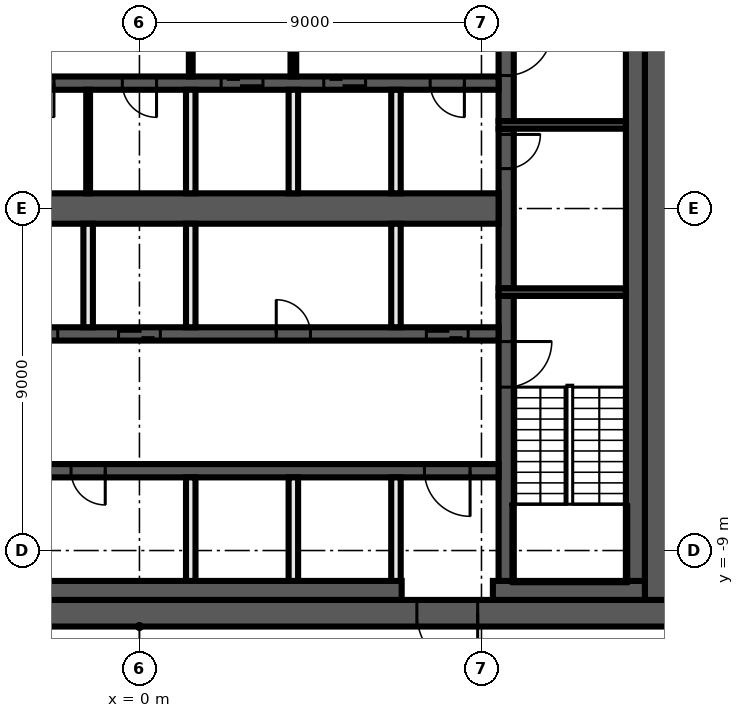
"""IFC4 building model, lengths in metres.
Left out: names, types, materials, properties, quantities, classifications, styles, units other than length and angle.
Written with IfcOpenShell. Run it as: python <this file> out.ifc"""

import sys

from ifc_helpers import new_model, si_unit, direction, frame, frame_2d, origin, place, context, subcontext, project, spatial, rectangle, extrude, element, fill, save


model = new_model("IFC4")
c1 = context("Model", 3, precision=1e-05, world=origin(), true_north=direction((0.0, 1.0)))
c2 = subcontext(c1, "Body", "Model", "MODEL_VIEW")
j1 = project(units=[si_unit("LENGTHUNIT", "METRE"), si_unit("PLANEANGLEUNIT", "RADIAN")], contexts=[c1])
p1 = place(None, origin())
s1 = spatial("IfcSite", under=j1, at=p1, CompositionType="ELEMENT")
p2 = place(p1, origin())
s2 = spatial("IfcBuilding", under=s1, at=p2, CompositionType="ELEMENT")
p3 = place(p2, frame((0.0, 0.0, 270.6)))
s3 = spatial("IfcBuildingStorey", under=s2, at=p3, CompositionType="ELEMENT", Elevation=270.6)
p4 = place(p3, frame((14.0, -10.65, 0.0), z_axis=(0.0, 0.0, 1.0), x_axis=(-1.0, 0.0, 0.0)))
e1 = element("IfcWall", 1, at=p4, inside=s3, PredefinedType="SHEAR", context=c2, shape_type="SweptSolid", body=[
    extrude(rectangle(XDim=28.0, YDim=0.7, at=frame_2d((14.0, 0.0))), origin(), (0.0, 0.0, 1.0), 3.82),
])
p5 = place(p4, frame((5.1, 0.0, 0.0)))
e2 = element("IfcOpeningElement", 2, at=p5, cuts=e1, PredefinedType="OPENING", context=c2, shape_type="SweptSolid", body=[
    extrude(rectangle(XDim=1.6, YDim=2.1, at=frame_2d((0.8, 1.05))), frame((0.0, 0.36, 0.0), z_axis=(0.0, -1.0, 0.0), x_axis=(1.0, 0.0, 0.0)), (0.0, 0.0, 1.0), 0.72),
])
p6 = place(p3, frame((13.65, 10.3, 0.0), z_axis=(0.0, 0.0, 1.0), x_axis=(0.0, -1.0, 0.0)))
e3 = element("IfcWall", 3, at=p6, inside=s3, PredefinedType="SHEAR", context=c2, shape_type="SweptSolid", body=[
    extrude(rectangle(XDim=20.6, YDim=0.7, at=frame_2d((10.3, 0.0))), origin(), (0.0, 0.0, 1.0), 3.82),
])
p7 = place(p3, frame((13.3, -10.05, 0.0), z_axis=(0.0, 0.0, 1.0), x_axis=(-1.0, 0.0, 0.0)))
e4 = element("IfcWall", 4, at=p7, inside=s3, PredefinedType="SHEAR", context=c2, shape_type="SweptSolid", body=[
    extrude(rectangle(XDim=4.0, YDim=0.5, at=frame_2d((2.0, 0.0))), origin(), (0.0, 0.0, 1.0), 3.82),
])
p8 = place(p3, frame((6.9, -10.05, 0.0), z_axis=(0.0, 0.0, 1.0), x_axis=(-1.0, 0.0, 0.0)))
e5 = element("IfcWall", 5, at=p8, inside=s3, PredefinedType="SHEAR", context=c2, shape_type="SweptSolid", body=[
    extrude(rectangle(XDim=20.2, YDim=0.5, at=frame_2d((10.1, 0.0))), origin(), (0.0, 0.0, 1.0), 3.82),
])
p9 = place(p3, frame((13.05, 9.8, 0.0), z_axis=(0.0, 0.0, 1.0), x_axis=(0.0, -1.0, 0.0)))
e6 = element("IfcWall", 6, at=p9, inside=s3, PredefinedType="SHEAR", context=c2, shape_type="SweptSolid", body=[
    extrude(rectangle(XDim=19.6, YDim=0.5, at=frame_2d((9.8, 0.0))), origin(), (0.0, 0.0, 1.0), 3.82),
])
p10 = place(p3, frame((9.65, -2.3, 0.0), z_axis=(0.0, 0.0, 1.0), x_axis=(0.0, -1.0, 0.0)))
e7 = element("IfcWall", 7, at=p10, inside=s3, PredefinedType="SHEAR", context=c2, shape_type="SweptSolid", body=[
    extrude(rectangle(XDim=7.5, YDim=0.4, at=frame_2d((3.75, 0.0))), origin(), (0.0, 0.0, 1.0), 3.82),
])
p11 = place(p10, frame((1.2, 0.0, 0.0)))
e8 = element("IfcOpeningElement", 8, at=p11, cuts=e7, PredefinedType="OPENING", context=c2, shape_type="SweptSolid", body=[
    extrude(rectangle(XDim=1.2, YDim=2.1, at=frame_2d((0.6, 1.05))), frame((0.0, 0.21, 0.0), z_axis=(0.0, -1.0, 0.0), x_axis=(1.0, 0.0, 0.0)), (0.0, 0.0, 1.0), 0.42),
])
p12 = place(p3, frame((9.65, 2.1, 0.0), z_axis=(0.0, 0.0, 1.0), x_axis=(0.0, -1.0, 0.0)))
e9 = element("IfcWall", 9, at=p12, inside=s3, PredefinedType="SHEAR", context=c2, shape_type="SweptSolid", body=[
    extrude(rectangle(XDim=4.2, YDim=0.4, at=frame_2d((2.1, 0.0))), origin(), (0.0, 0.0, 1.0), 3.82),
])
p13 = place(p12, frame((0.15, 0.0, 0.0)))
e10 = element("IfcOpeningElement", 10, at=p13, cuts=e9, PredefinedType="OPENING", context=c2, shape_type="SweptSolid", body=[
    extrude(rectangle(XDim=0.9, YDim=2.1, at=frame_2d((0.45, 1.05))), frame((0.0, 0.21, 0.0), z_axis=(0.0, -1.0, 0.0), x_axis=(1.0, 0.0, 0.0)), (0.0, 0.0, 1.0), 0.42),
])
p14 = place(p3, frame((9.65, 9.8, 0.0), z_axis=(0.0, 0.0, 1.0), x_axis=(0.0, -1.0, 0.0)))
e11 = element("IfcWall", 11, at=p14, inside=s3, PredefinedType="SHEAR", context=c2, shape_type="SweptSolid", body=[
    extrude(rectangle(XDim=7.5, YDim=0.4, at=frame_2d((3.75, 0.0))), origin(), (0.0, 0.0, 1.0), 3.82),
])
p15 = place(p14, frame((5.1, 0.0, 0.0)))
e12 = element("IfcOpeningElement", 12, at=p15, cuts=e11, PredefinedType="OPENING", context=c2, shape_type="SweptSolid", body=[
    extrude(rectangle(XDim=1.2, YDim=2.1, at=frame_2d((0.6, 1.05))), frame((0.0, 0.21, 0.0), z_axis=(0.0, -1.0, 0.0), x_axis=(1.0, 0.0, 0.0)), (0.0, 0.0, 1.0), 0.42),
])
for number, where, z_axis, x_axis in (
    (13, (9.45, 2.2, 0.0), (0.0, 0.0, 1.0), (1.0, 0.0, 0.0)),
    (14, (9.45, -2.2, 0.0), (0.0, 0.0, 1.0), (1.0, 0.0, 0.0)),
):
    element("IfcWall", number, at=place(p3, frame(where, z_axis=z_axis, x_axis=x_axis)), inside=s3, PredefinedType="SHEAR", context=c2, shape_type="SweptSolid", body=[
        extrude(rectangle(XDim=3.35, YDim=0.2, at=frame_2d((1.675, 0.0))), origin(), (0.0, 0.0, 1.0), 3.82),
    ])
p16 = place(p3, frame((9.45, 3.3, 0.0), z_axis=(0.0, 0.0, 1.0), x_axis=(-1.0, 0.0, 0.0)))
e15 = element("IfcWall", 15, at=p16, inside=s3, PredefinedType="SHEAR", context=c2, shape_type="SweptSolid", body=[
    extrude(rectangle(XDim=18.9, YDim=0.35, at=frame_2d((9.45, 0.0))), origin(), (0.0, 0.0, 1.0), 3.82),
])
p17 = place(p16, frame((6.2, 0.0, 0.0)))
e16 = element("IfcOpeningElement", 16, at=p17, cuts=e15, PredefinedType="OPENING", context=c2, shape_type="SweptSolid", body=[
    extrude(rectangle(XDim=1.1, YDim=2.1, at=frame_2d((0.55, 1.05))), frame((0.0, 0.185, 0.0), z_axis=(0.0, -1.0, 0.0), x_axis=(1.0, 0.0, 0.0)), (0.0, 0.0, 1.0), 0.37),
])
p18 = place(p16, frame((3.5, 0.0, 0.0)))
e17 = element("IfcOpeningElement", 17, at=p18, cuts=e15, PredefinedType="OPENING", context=c2, shape_type="SweptSolid", body=[
    extrude(rectangle(XDim=1.1, YDim=2.1, at=frame_2d((0.55, 1.05))), frame((0.0, 0.185, 0.0), z_axis=(0.0, -1.0, 0.0), x_axis=(1.0, 0.0, 0.0)), (0.0, 0.0, 1.0), 0.37),
])
p19 = place(p16, frame((0.9, 0.0, 0.0)))
e18 = element("IfcOpeningElement", 18, at=p19, cuts=e15, PredefinedType="OPENING", context=c2, shape_type="SweptSolid", body=[
    extrude(rectangle(XDim=0.9, YDim=2.1, at=frame_2d((0.45, 1.05))), frame((0.0, 0.185, 0.0), z_axis=(0.0, -1.0, 0.0), x_axis=(1.0, 0.0, 0.0)), (0.0, 0.0, 1.0), 0.37),
])
p20 = place(p16, frame((17.1, 0.0, 0.0)))
e19 = element("IfcOpeningElement", 19, at=p20, cuts=e15, PredefinedType="OPENING", context=c2, shape_type="SweptSolid", body=[
    extrude(rectangle(XDim=0.9, YDim=2.1, at=frame_2d((0.45, 1.05))), frame((0.0, 0.185, 0.0), z_axis=(0.0, -1.0, 0.0), x_axis=(1.0, 0.0, 0.0)), (0.0, 0.0, 1.0), 0.37),
])
p21 = place(p16, frame((14.4, 0.0, 0.0)))
e20 = element("IfcOpeningElement", 20, at=p21, cuts=e15, PredefinedType="OPENING", context=c2, shape_type="SweptSolid", body=[
    extrude(rectangle(XDim=0.9, YDim=2.1, at=frame_2d((0.45, 1.05))), frame((0.0, 0.185, 0.0), z_axis=(0.0, -1.0, 0.0), x_axis=(1.0, 0.0, 0.0)), (0.0, 0.0, 1.0), 0.37),
])
p22 = place(p16, frame((11.7, 0.0, 0.0)))
e21 = element("IfcOpeningElement", 21, at=p22, cuts=e15, PredefinedType="OPENING", context=c2, shape_type="SweptSolid", body=[
    extrude(rectangle(XDim=0.9, YDim=2.1, at=frame_2d((0.45, 1.05))), frame((0.0, 0.185, 0.0), z_axis=(0.0, -1.0, 0.0), x_axis=(1.0, 0.0, 0.0)), (0.0, 0.0, 1.0), 0.37),
])
p23 = place(p16, frame((9.0, 0.0, 0.0)))
e22 = element("IfcOpeningElement", 22, at=p23, cuts=e15, PredefinedType="OPENING", context=c2, shape_type="SweptSolid", body=[
    extrude(rectangle(XDim=0.9, YDim=2.1, at=frame_2d((0.45, 1.05))), frame((0.0, 0.185, 0.0), z_axis=(0.0, -1.0, 0.0), x_axis=(1.0, 0.0, 0.0)), (0.0, 0.0, 1.0), 0.37),
])
p24 = place(p3, frame((-9.45, -3.3, 0.0), z_axis=(0.0, 0.0, 1.0), x_axis=(1.0, 0.0, 0.0)))
e23 = element("IfcWall", 23, at=p24, inside=s3, PredefinedType="SHEAR", context=c2, shape_type="SweptSolid", body=[
    extrude(rectangle(XDim=18.9, YDim=0.35, at=frame_2d((9.45, 0.0))), origin(), (0.0, 0.0, 1.0), 3.82),
])
p25 = place(p24, frame((0.8, 0.0, 0.0)))
e24 = element("IfcOpeningElement", 24, at=p25, cuts=e23, PredefinedType="OPENING", context=c2, shape_type="SweptSolid", body=[
    extrude(rectangle(XDim=1.1, YDim=2.1, at=frame_2d((0.55, 1.05))), frame((0.0, 0.185, 0.0), z_axis=(0.0, -1.0, 0.0), x_axis=(1.0, 0.0, 0.0)), (0.0, 0.0, 1.0), 0.37),
])
p26 = place(p24, frame((3.5, 0.0, 0.0)))
e25 = element("IfcOpeningElement", 25, at=p26, cuts=e23, PredefinedType="OPENING", context=c2, shape_type="SweptSolid", body=[
    extrude(rectangle(XDim=1.1, YDim=2.1, at=frame_2d((0.55, 1.05))), frame((0.0, 0.185, 0.0), z_axis=(0.0, -1.0, 0.0), x_axis=(1.0, 0.0, 0.0)), (0.0, 0.0, 1.0), 0.37),
])
p27 = place(p24, frame((6.2, 0.0, 0.0)))
e26 = element("IfcOpeningElement", 26, at=p27, cuts=e23, PredefinedType="OPENING", context=c2, shape_type="SweptSolid", body=[
    extrude(rectangle(XDim=1.1, YDim=2.1, at=frame_2d((0.55, 1.05))), frame((0.0, 0.185, 0.0), z_axis=(0.0, -1.0, 0.0), x_axis=(1.0, 0.0, 0.0)), (0.0, 0.0, 1.0), 0.37),
])
p28 = place(p24, frame((8.9, 0.0, 0.0)))
e27 = element("IfcOpeningElement", 27, at=p28, cuts=e23, PredefinedType="OPENING", context=c2, shape_type="SweptSolid", body=[
    extrude(rectangle(XDim=1.1, YDim=2.1, at=frame_2d((0.55, 1.05))), frame((0.0, 0.185, 0.0), z_axis=(0.0, -1.0, 0.0), x_axis=(1.0, 0.0, 0.0)), (0.0, 0.0, 1.0), 0.37),
])
p29 = place(p24, frame((17.0, 0.0, 0.0)))
e28 = element("IfcOpeningElement", 28, at=p29, cuts=e23, PredefinedType="OPENING", context=c2, shape_type="SweptSolid", body=[
    extrude(rectangle(XDim=1.1, YDim=2.1, at=frame_2d((0.55, 1.05))), frame((0.0, 0.185, 0.0), z_axis=(0.0, -1.0, 0.0), x_axis=(1.0, 0.0, 0.0)), (0.0, 0.0, 1.0), 0.37),
])
p30 = place(p24, frame((13.05, 0.0, 0.0)))
e29 = element("IfcOpeningElement", 29, at=p30, cuts=e23, PredefinedType="OPENING", context=c2, shape_type="SweptSolid", body=[
    extrude(rectangle(XDim=0.9, YDim=2.1, at=frame_2d((0.45, 1.05))), frame((0.0, 0.185, 0.0), z_axis=(0.0, -1.0, 0.0), x_axis=(1.0, 0.0, 0.0)), (0.0, 0.0, 1.0), 0.37),
])
p31 = place(p3, frame((9.45, -6.9, 0.0), z_axis=(0.0, 0.0, 1.0), x_axis=(-1.0, 0.0, 0.0)))
e30 = element("IfcWall", 30, at=p31, inside=s3, PredefinedType="SHEAR", context=c2, shape_type="SweptSolid", body=[
    extrude(rectangle(XDim=18.9, YDim=0.35, at=frame_2d((9.45, 0.0))), origin(), (0.0, 0.0, 1.0), 3.82),
])
p32 = place(p31, frame((0.75, 0.0, 0.0)))
e31 = element("IfcOpeningElement", 31, at=p32, cuts=e30, PredefinedType="OPENING", context=c2, shape_type="SweptSolid", body=[
    extrude(rectangle(XDim=1.2, YDim=2.1, at=frame_2d((0.6, 1.05))), frame((0.0, 0.185, 0.0), z_axis=(0.0, -1.0, 0.0), x_axis=(1.0, 0.0, 0.0)), (0.0, 0.0, 1.0), 0.37),
])
p33 = place(p31, frame((15.75, 0.0, 0.0)))
e32 = element("IfcOpeningElement", 32, at=p33, cuts=e30, PredefinedType="OPENING", context=c2, shape_type="SweptSolid", body=[
    extrude(rectangle(XDim=0.9, YDim=2.1, at=frame_2d((0.45, 1.05))), frame((0.0, 0.185, 0.0), z_axis=(0.0, -1.0, 0.0), x_axis=(1.0, 0.0, 0.0)), (0.0, 0.0, 1.0), 0.37),
])
p34 = place(p31, frame((10.35, 0.0, 0.0)))
e33 = element("IfcOpeningElement", 33, at=p34, cuts=e30, PredefinedType="OPENING", context=c2, shape_type="SweptSolid", body=[
    extrude(rectangle(XDim=0.9, YDim=2.1, at=frame_2d((0.45, 1.05))), frame((0.0, 0.185, 0.0), z_axis=(0.0, -1.0, 0.0), x_axis=(1.0, 0.0, 0.0)), (0.0, 0.0, 1.0), 0.37),
])
p35 = place(p3, frame((-9.45, 0.0, 0.0), z_axis=(0.0, 0.0, 1.0), x_axis=(1.0, 0.0, 0.0)))
e34 = element("IfcWall", 34, at=p35, inside=s3, PredefinedType="SHEAR", context=c2, shape_type="SweptSolid", body=[
    extrude(rectangle(XDim=18.9, YDim=0.8, at=frame_2d((9.45, 0.0))), origin(), (0.0, 0.0, 1.0), 3.82),
])
for number, where, z_axis, x_axis in (
    (35, (6.75, -9.8, 0.0), (0.0, 0.0, 1.0), (0.0, 1.0, 0.0)),
    (36, (6.75, -3.125, 0.0), (0.0, 0.0, 1.0), (0.0, 1.0, 0.0)),
    (37, (6.75, 0.4, 0.0), (0.0, 0.0, 1.0), (0.0, 1.0, 0.0)),
):
    element("IfcWall", number, at=place(p3, frame(where, z_axis=z_axis, x_axis=x_axis)), inside=s3, PredefinedType="SOLIDWALL", context=c2, shape_type="SweptSolid", body=[
        extrude(rectangle(XDim=2.725, YDim=0.25, at=frame_2d((1.363, 0.0))), origin(), (0.0, 0.0, 1.0), 3.82),
    ])
p36 = place(p3, frame((4.05, 6.725, 0.0), z_axis=(0.0, 0.0, 1.0), x_axis=(0.0, -1.0, 0.0)))
e38 = element("IfcWall", 38, at=p36, inside=s3, PredefinedType="PARTITIONING", context=c2, shape_type="SweptSolid", body=[
    extrude(rectangle(XDim=3.25, YDim=0.15, at=frame_2d((1.625, 0.0))), origin(), (0.0, 0.0, 1.0), 3.82),
])
p37 = place(p36, frame((1.025, 0.0, 0.0)))
e39 = element("IfcOpeningElement", 39, at=p37, cuts=e38, PredefinedType="OPENING", context=c2, shape_type="SweptSolid", body=[
    extrude(rectangle(XDim=1.2, YDim=2.1, at=frame_2d((0.6, 1.05))), frame((0.0, 0.085, 0.0), z_axis=(0.0, -1.0, 0.0), x_axis=(1.0, 0.0, 0.0)), (0.0, 0.0, 1.0), 0.17),
])
for number, where, z_axis, x_axis in (
    (40, (4.05, -9.8, 0.0), (0.0, 0.0, 1.0), (0.0, 1.0, 0.0)),
    (41, (4.05, 0.4, 0.0), (0.0, 0.0, 1.0), (0.0, 1.0, 0.0)),
):
    element("IfcWall", number, at=place(p3, frame(where, z_axis=z_axis, x_axis=x_axis)), inside=s3, PredefinedType="SOLIDWALL", context=c2, shape_type="SweptSolid", body=[
        extrude(rectangle(XDim=2.725, YDim=0.25, at=frame_2d((1.363, 0.0))), origin(), (0.0, 0.0, 1.0), 3.82),
    ])
p38 = place(p3, frame((1.35, 6.725, 0.0), z_axis=(0.0, 0.0, 1.0), x_axis=(0.0, -1.0, 0.0)))
e42 = element("IfcWall", 42, at=p38, inside=s3, PredefinedType="PARTITIONING", context=c2, shape_type="SweptSolid", body=[
    extrude(rectangle(XDim=3.25, YDim=0.1, at=frame_2d((1.625, 0.0))), origin(), (0.0, 0.0, 1.0), 3.82),
])
p39 = place(p38, frame((1.025, 0.0, 0.0)))
e43 = element("IfcOpeningElement", 43, at=p39, cuts=e42, PredefinedType="OPENING", context=c2, shape_type="SweptSolid", body=[
    extrude(rectangle(XDim=1.2, YDim=2.1, at=frame_2d((0.6, 1.05))), frame((0.0, 0.06, 0.0), z_axis=(0.0, -1.0, 0.0), x_axis=(1.0, 0.0, 0.0)), (0.0, 0.0, 1.0), 0.12),
])
for number, where, z_axis, x_axis in (
    (44, (1.35, -9.8, 0.0), (0.0, 0.0, 1.0), (0.0, 1.0, 0.0)),
    (45, (1.35, -3.125, 0.0), (0.0, 0.0, 1.0), (0.0, 1.0, 0.0)),
    (46, (1.35, 0.4, 0.0), (0.0, 0.0, 1.0), (0.0, 1.0, 0.0)),
):
    element("IfcWall", number, at=place(p3, frame(where, z_axis=z_axis, x_axis=x_axis)), inside=s3, PredefinedType="SOLIDWALL", context=c2, shape_type="SweptSolid", body=[
        extrude(rectangle(XDim=2.725, YDim=0.25, at=frame_2d((1.363, 0.0))), origin(), (0.0, 0.0, 1.0), 3.82),
    ])
p40 = place(p3, frame((-1.35, 0.4, 0.0), z_axis=(0.0, 0.0, 1.0), x_axis=(0.0, 1.0, 0.0)))
e47 = element("IfcWall", 47, at=p40, inside=s3, PredefinedType="PARTITIONING", context=c2, shape_type="SweptSolid", body=[
    extrude(rectangle(XDim=2.725, YDim=0.1, at=frame_2d((1.363, 0.0))), origin(), (0.0, 0.0, 1.0), 3.82),
])
p41 = place(p3, frame((-1.35, -3.125, 0.0), z_axis=(0.0, 0.0, 1.0), x_axis=(0.0, 1.0, 0.0)))
e48 = element("IfcWall", 48, at=p41, inside=s3, PredefinedType="SOLIDWALL", context=c2, shape_type="SweptSolid", body=[
    extrude(rectangle(XDim=2.725, YDim=0.25, at=frame_2d((1.363, 0.0))), origin(), (0.0, 0.0, 1.0), 3.82),
])
p42 = place(p13, origin())
e49 = element("IfcDoor", 49, at=p42, inside=s3, OperationType="SINGLE_SWING_RIGHT", PredefinedType="DOOR", context=c2, shape_type="SweptSolid", body=[
    extrude(rectangle(XDim=0.9, YDim=2.1, at=frame_2d((0.45, 1.05))), frame((0.0, 0.025, 0.0), z_axis=(0.0, -1.0, 0.0), x_axis=(1.0, 0.0, 0.0)), (0.0, 0.0, 1.0), 0.05),
])
fill(e10, e49)
p43 = place(p17, origin())
e50 = element("IfcDoor", 50, at=p43, inside=s3, OperationType="DOUBLE_DOOR_SLIDING", PredefinedType="DOOR", context=c2, shape_type="SweptSolid", body=[
    extrude(rectangle(XDim=1.1, YDim=2.1, at=frame_2d((0.55, 1.05))), frame((0.0, 0.025, 0.0), z_axis=(0.0, -1.0, 0.0), x_axis=(1.0, 0.0, 0.0)), (0.0, 0.0, 1.0), 0.05),
])
fill(e16, e50)
p44 = place(p18, origin())
e51 = element("IfcDoor", 51, at=p44, inside=s3, OperationType="DOUBLE_DOOR_SLIDING", PredefinedType="DOOR", context=c2, shape_type="SweptSolid", body=[
    extrude(rectangle(XDim=1.1, YDim=2.1, at=frame_2d((0.55, 1.05))), frame((0.0, 0.025, 0.0), z_axis=(0.0, -1.0, 0.0), x_axis=(1.0, 0.0, 0.0)), (0.0, 0.0, 1.0), 0.05),
])
fill(e17, e51)
p45 = place(p19, origin())
e52 = element("IfcDoor", 52, at=p45, inside=s3, OperationType="SINGLE_SWING_LEFT", PredefinedType="DOOR", context=c2, shape_type="SweptSolid", body=[
    extrude(rectangle(XDim=0.9, YDim=2.1, at=frame_2d((0.45, 1.05))), frame((0.0, 0.025, 0.0), z_axis=(0.0, -1.0, 0.0), x_axis=(1.0, 0.0, 0.0)), (0.0, 0.0, 1.0), 0.05),
])
fill(e18, e52)
p46 = place(p27, origin())
e53 = element("IfcDoor", 53, at=p46, inside=s3, OperationType="DOUBLE_DOOR_SLIDING", PredefinedType="DOOR", context=c2, shape_type="SweptSolid", body=[
    extrude(rectangle(XDim=1.1, YDim=2.1, at=frame_2d((0.55, 1.05))), frame((0.0, 0.025, 0.0), z_axis=(0.0, -1.0, 0.0), x_axis=(1.0, 0.0, 0.0)), (0.0, 0.0, 1.0), 0.05),
])
fill(e26, e53)
p47 = place(p28, origin())
e54 = element("IfcDoor", 54, at=p47, inside=s3, OperationType="DOUBLE_DOOR_SLIDING", PredefinedType="DOOR", context=c2, shape_type="SweptSolid", body=[
    extrude(rectangle(XDim=1.1, YDim=2.1, at=frame_2d((0.55, 1.05))), frame((0.0, 0.025, 0.0), z_axis=(0.0, -1.0, 0.0), x_axis=(1.0, 0.0, 0.0)), (0.0, 0.0, 1.0), 0.05),
])
fill(e27, e54)
p48 = place(p29, origin())
e55 = element("IfcDoor", 55, at=p48, inside=s3, OperationType="DOUBLE_DOOR_SLIDING", PredefinedType="DOOR", context=c2, shape_type="SweptSolid", body=[
    extrude(rectangle(XDim=1.1, YDim=2.1, at=frame_2d((0.55, 1.05))), frame((0.0, 0.025, 0.0), z_axis=(0.0, -1.0, 0.0), x_axis=(1.0, 0.0, 0.0)), (0.0, 0.0, 1.0), 0.05),
])
fill(e28, e55)
p49 = place(p5, origin())
e56 = element("IfcDoor", 56, at=p49, inside=s3, OperationType="DOUBLE_DOOR_SINGLE_SWING", PredefinedType="DOOR", context=c2, shape_type="SweptSolid", body=[
    extrude(rectangle(XDim=1.6, YDim=2.1, at=frame_2d((0.8, 1.05))), frame((0.0, 0.025, 0.0), z_axis=(0.0, -1.0, 0.0), x_axis=(1.0, 0.0, 0.0)), (0.0, 0.0, 1.0), 0.05),
])
fill(e2, e56)
p50 = place(p32, origin())
e57 = element("IfcDoor", 57, at=p50, inside=s3, OperationType="SINGLE_SWING_LEFT", PredefinedType="DOOR", context=c2, shape_type="SweptSolid", body=[
    extrude(rectangle(XDim=1.2, YDim=2.1, at=frame_2d((0.6, 1.05))), frame((0.0, 0.025, 0.0), z_axis=(0.0, -1.0, 0.0), x_axis=(1.0, 0.0, 0.0)), (0.0, 0.0, 1.0), 0.05),
])
fill(e31, e57)
p51 = place(p22, origin())
e58 = element("IfcDoor", 58, at=p51, inside=s3, OperationType="SINGLE_SWING_RIGHT", PredefinedType="DOOR", context=c2, shape_type="SweptSolid", body=[
    extrude(rectangle(XDim=0.9, YDim=2.1, at=frame_2d((0.45, 1.05))), frame((0.0, 0.025, 0.0), z_axis=(0.0, -1.0, 0.0), x_axis=(1.0, 0.0, 0.0)), (0.0, 0.0, 1.0), 0.05),
])
fill(e21, e58)
p52 = place(p23, origin())
e59 = element("IfcDoor", 59, at=p52, inside=s3, OperationType="SINGLE_SWING_LEFT", PredefinedType="DOOR", context=c2, shape_type="SweptSolid", body=[
    extrude(rectangle(XDim=0.9, YDim=2.1, at=frame_2d((0.45, 1.05))), frame((0.0, 0.025, 0.0), z_axis=(0.0, -1.0, 0.0), x_axis=(1.0, 0.0, 0.0)), (0.0, 0.0, 1.0), 0.05),
])
fill(e22, e59)
p53 = place(p30, origin())
e60 = element("IfcDoor", 60, at=p53, inside=s3, OperationType="SINGLE_SWING_RIGHT", PredefinedType="DOOR", context=c2, shape_type="SweptSolid", body=[
    extrude(rectangle(XDim=0.9, YDim=2.1, at=frame_2d((0.45, 1.05))), frame((0.0, 0.025, 0.0), z_axis=(0.0, -1.0, 0.0), x_axis=(1.0, 0.0, 0.0)), (0.0, 0.0, 1.0), 0.05),
])
fill(e29, e60)
p54 = place(p34, origin())
e61 = element("IfcDoor", 61, at=p54, inside=s3, OperationType="SINGLE_SWING_RIGHT", PredefinedType="DOOR", context=c2, shape_type="SweptSolid", body=[
    extrude(rectangle(XDim=0.9, YDim=2.1, at=frame_2d((0.45, 1.05))), frame((0.0, 0.025, 0.0), z_axis=(0.0, -1.0, 0.0), x_axis=(1.0, 0.0, 0.0)), (0.0, 0.0, 1.0), 0.05),
])
fill(e33, e61)
p55 = place(p15, origin())
e62 = element("IfcDoor", 62, at=p55, inside=s3, OperationType="SINGLE_SWING_LEFT", PredefinedType="DOOR", context=c2, shape_type="SweptSolid", body=[
    extrude(rectangle(XDim=1.2, YDim=2.1, at=frame_2d((0.6, 1.05))), frame((0.0, 0.025, 0.0), z_axis=(0.0, -1.0, 0.0), x_axis=(1.0, 0.0, 0.0)), (0.0, 0.0, 1.0), 0.05),
])
fill(e12, e62)
p56 = place(p11, origin())
e63 = element("IfcDoor", 63, at=p56, inside=s3, OperationType="SINGLE_SWING_RIGHT", PredefinedType="DOOR", context=c2, shape_type="SweptSolid", body=[
    extrude(rectangle(XDim=1.2, YDim=2.1, at=frame_2d((0.6, 1.05))), frame((0.0, 0.025, 0.0), z_axis=(0.0, -1.0, 0.0), x_axis=(1.0, 0.0, 0.0)), (0.0, 0.0, 1.0), 0.05),
])
fill(e8, e63)
save(model, sys.argv[1])
